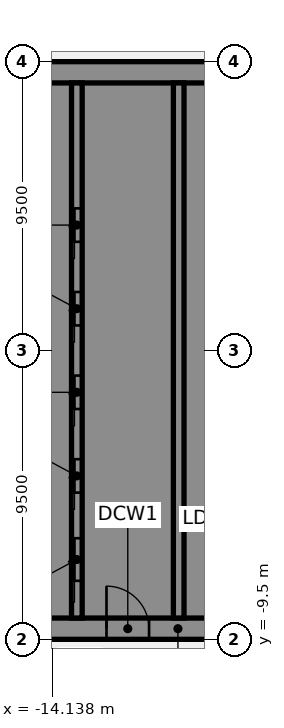
"""IFC4 building model, lengths in metres.
Left out: names, types, materials, properties, quantities, classifications, styles, units other than length and angle.
Written with IfcOpenShell. Run it as: python <this file> out.ifc"""

import sys

from ifc_helpers import new_model, si_unit, direction, frame, frame_2d, origin, place, context, subcontext, project, spatial, polyline, rectangle, outline, extrude, element, fill, save


model = new_model("IFC4")
c1 = context("Model", 3, precision=1e-05, world=origin(), true_north=direction((0.0, 1.0)))
c2 = subcontext(c1, "Body", "Model", "MODEL_VIEW")
j1 = project(units=[si_unit("LENGTHUNIT", "METRE"), si_unit("PLANEANGLEUNIT", "RADIAN")], contexts=[c1])
p1 = place(None, origin())
s1 = spatial("IfcSite", under=j1, at=p1, CompositionType="ELEMENT")
p2 = place(p1, origin())
s2 = spatial("IfcBuilding", under=s1, at=p2, CompositionType="ELEMENT")
p3 = place(p2, frame((0.0, 0.0, 34.0)))
s3 = spatial("IfcBuildingStorey", under=s2, at=p3, CompositionType="ELEMENT", Elevation=34.0)
p4 = place(p3, frame((-16.5, -9.15, 0.0), z_axis=(0.0, 0.0, 1.0), x_axis=(1.0, 0.0, 0.0)))
e1 = element("IfcWall", 1, at=p4, inside=s3, PredefinedType="SHEAR", context=c2, shape_type="SweptSolid", body=[
    extrude(rectangle(XDim=13.0, YDim=0.7, at=frame_2d((6.5, 0.0))), origin(), (0.0, 0.0, 1.0), 3.61),
])
p5 = place(p4, frame((4.15, 0.0, 0.0)))
e2 = element("IfcOpeningElement", 2, at=p5, cuts=e1, PredefinedType="OPENING", context=c2, shape_type="SweptSolid", body=[
    extrude(rectangle(XDim=1.4, YDim=2.1, at=frame_2d((0.7, 1.05))), frame((0.0, 0.36, 0.0), z_axis=(0.0, -1.0, 0.0), x_axis=(1.0, 0.0, 0.0)), (0.0, 0.0, 1.0), 0.72),
])
p6 = place(p4, frame((10.125, 0.0, 0.0)))
e3 = element("IfcOpeningElement", 3, at=p6, cuts=e1, PredefinedType="OPENING", context=c2, shape_type="SweptSolid", body=[
    extrude(rectangle(XDim=1.4, YDim=2.1, at=frame_2d((0.7, 1.05))), frame((0.0, 0.36, 0.0), z_axis=(0.0, -1.0, 0.0), x_axis=(1.0, 0.0, 0.0)), (0.0, 0.0, 1.0), 0.72),
])
p7 = place(p3, origin())
e4 = element("IfcWall", 4, at=p7, inside=s3, PredefinedType="SHEAR", context=c2, shape_type="SweptSolid", body=[
    extrude(outline(polyline([(-13.5, -8.8), (-13.5, -8.125), (-15.8, -8.125), (-15.8, -5.625), (-13.5, -5.625), (-13.5, -5.375), (-15.8, -5.375), (-15.8, -2.875), (-13.5, -2.875), (-13.5, -2.625), (-15.8, -2.625), (-15.8, -0.125), (-13.5, -0.125), (-13.5, 0.125), (-15.8, 0.125), (-15.8, 2.625), (-13.5, 2.625), (-13.5, 2.875), (-15.8, 2.875), (-15.8, 5.375), (-13.5, 5.375), (-13.5, 5.625), (-15.8, 5.625), (-15.8, 8.125), (-13.5, 8.125), (-13.5, 8.8), (-15.8, 8.8), (-16.5, 8.8), (-16.5, -8.8), (-15.8, -8.8), (-13.5, -8.8)])), origin(), (0.0, 0.0, 1.0), 3.61),
])
p8 = place(p3, frame((-16.5, 9.15, 0.0), z_axis=(0.0, 0.0, 1.0), x_axis=(1.0, 0.0, 0.0)))
e5 = element("IfcWall", 5, at=p8, inside=s3, PredefinedType="SHEAR", context=c2, shape_type="SweptSolid", body=[
    extrude(rectangle(XDim=13.0, YDim=0.7, at=frame_2d((6.5, 0.0))), origin(), (0.0, 0.0, 1.0), 3.61),
])
p9 = place(p3, origin())
e6 = element("IfcWall", 6, at=p9, inside=s3, PredefinedType="SHEAR", context=c2, shape_type="SweptSolid", body=[
    extrude(outline(polyline([(-9.8, -5.375), (-9.8, -5.625), (-7.5, -5.625), (-7.15, -5.625), (-7.15, 8.8), (-7.5, 8.8), (-9.8, 8.8), (-9.8, 8.125), (-7.5, 8.125), (-7.5, 5.625), (-9.8, 5.625), (-9.8, 5.375), (-7.5, 5.375), (-7.5, 2.875), (-9.8, 2.875), (-9.8, 2.625), (-7.5, 2.625), (-7.5, 0.125), (-9.8, 0.125), (-9.8, -0.125), (-7.5, -0.125), (-7.5, -2.625), (-9.8, -2.625), (-9.8, -2.875), (-7.5, -2.875), (-7.5, -5.375), (-9.8, -5.375)])), origin(), (0.0, 0.0, 1.0), 3.61),
])
p10 = place(p3, origin())
e7 = element("IfcWall", 7, at=p10, inside=s3, PredefinedType="SHEAR", context=c2, shape_type="SweptSolid", body=[
    extrude(outline(polyline([(-7.5, -8.125), (-9.55, -8.125), (-9.55, -5.625), (-9.8, -5.625), (-9.8, -8.125), (-9.8, -8.8), (-7.5, -8.8), (-7.5, -8.125)])), origin(), (0.0, 0.0, 1.0), 3.61),
])
p11 = place(p3, frame((-13.325, -8.8, 0.0), z_axis=(0.0, 0.0, 1.0), x_axis=(0.0, 1.0, 0.0)))
e8 = element("IfcWall", 8, at=p11, inside=s3, PredefinedType="SHEAR", context=c2, shape_type="SweptSolid", body=[
    extrude(rectangle(XDim=17.6, YDim=0.35, at=frame_2d((8.8, 0.0))), origin(), (0.0, 0.0, 1.0), 3.61),
])
p12 = place(p11, frame((1.225, 0.0, 0.0)))
e9 = element("IfcOpeningElement", 9, at=p12, cuts=e8, PredefinedType="OPENING", context=c2, shape_type="SweptSolid", body=[
    extrude(rectangle(XDim=1.4, YDim=2.1, at=frame_2d((0.7, 1.05))), frame((0.0, 0.185, 0.0), z_axis=(0.0, -1.0, 0.0), x_axis=(1.0, 0.0, 0.0)), (0.0, 0.0, 1.0), 0.37),
])
p13 = place(p11, frame((4.125, 0.0, 0.0)))
e10 = element("IfcOpeningElement", 10, at=p13, cuts=e8, PredefinedType="OPENING", context=c2, shape_type="SweptSolid", body=[
    extrude(rectangle(XDim=1.1, YDim=2.1, at=frame_2d((0.55, 1.05))), frame((0.0, 0.185, 0.0), z_axis=(0.0, -1.0, 0.0), x_axis=(1.0, 0.0, 0.0)), (0.0, 0.0, 1.0), 0.37),
])
p14 = place(p11, frame((6.875, 0.0, 0.0)))
e11 = element("IfcOpeningElement", 11, at=p14, cuts=e8, PredefinedType="OPENING", context=c2, shape_type="SweptSolid", body=[
    extrude(rectangle(XDim=1.1, YDim=2.1, at=frame_2d((0.55, 1.05))), frame((0.0, 0.185, 0.0), z_axis=(0.0, -1.0, 0.0), x_axis=(1.0, 0.0, 0.0)), (0.0, 0.0, 1.0), 0.37),
])
p15 = place(p11, frame((9.625, 0.0, 0.0)))
e12 = element("IfcOpeningElement", 12, at=p15, cuts=e8, PredefinedType="OPENING", context=c2, shape_type="SweptSolid", body=[
    extrude(rectangle(XDim=1.1, YDim=2.1, at=frame_2d((0.55, 1.05))), frame((0.0, 0.185, 0.0), z_axis=(0.0, -1.0, 0.0), x_axis=(1.0, 0.0, 0.0)), (0.0, 0.0, 1.0), 0.37),
])
p16 = place(p11, frame((12.375, 0.0, 0.0)))
e13 = element("IfcOpeningElement", 13, at=p16, cuts=e8, PredefinedType="OPENING", context=c2, shape_type="SweptSolid", body=[
    extrude(rectangle(XDim=1.1, YDim=2.1, at=frame_2d((0.55, 1.05))), frame((0.0, 0.185, 0.0), z_axis=(0.0, -1.0, 0.0), x_axis=(1.0, 0.0, 0.0)), (0.0, 0.0, 1.0), 0.37),
])
p17 = place(p3, frame((-9.975, -8.8, 0.0), z_axis=(0.0, 0.0, 1.0), x_axis=(0.0, 1.0, 0.0)))
e14 = element("IfcWall", 14, at=p17, inside=s3, PredefinedType="SHEAR", context=c2, shape_type="SweptSolid", body=[
    extrude(rectangle(XDim=17.6, YDim=0.35, at=frame_2d((8.8, 0.0))), origin(), (0.0, 0.0, 1.0), 3.61),
])
p18 = place(p5, origin())
e15 = element("IfcDoor", 15, at=p18, inside=s3, OperationType="SINGLE_SWING_LEFT", PredefinedType="DOOR", context=c2, shape_type="SweptSolid", body=[
    extrude(rectangle(XDim=1.4, YDim=2.1, at=frame_2d((0.7, 1.05))), frame((0.0, 0.025, 0.0), z_axis=(0.0, -1.0, 0.0), x_axis=(1.0, 0.0, 0.0)), (0.0, 0.0, 1.0), 0.05),
])
fill(e2, e15)
p19 = place(p12, origin())
e16 = element("IfcDoor", 16, at=p19, inside=s3, OperationType="SLIDING_TO_LEFT", PredefinedType="DOOR", context=c2, shape_type="SweptSolid", body=[
    extrude(rectangle(XDim=1.4, YDim=2.1, at=frame_2d((0.7, 1.05))), frame((0.0, 0.025, 0.0), z_axis=(0.0, -1.0, 0.0), x_axis=(1.0, 0.0, 0.0)), (0.0, 0.0, 1.0), 0.05),
])
fill(e9, e16)
p20 = place(p13, origin())
e17 = element("IfcDoor", 17, at=p20, inside=s3, OperationType="SLIDING_TO_LEFT", PredefinedType="DOOR", context=c2, shape_type="SweptSolid", body=[
    extrude(rectangle(XDim=1.1, YDim=2.1, at=frame_2d((0.55, 1.05))), frame((0.0, 0.025, 0.0), z_axis=(0.0, -1.0, 0.0), x_axis=(1.0, 0.0, 0.0)), (0.0, 0.0, 1.0), 0.05),
])
fill(e10, e17)
p21 = place(p14, origin())
e18 = element("IfcDoor", 18, at=p21, inside=s3, OperationType="SLIDING_TO_LEFT", PredefinedType="DOOR", context=c2, shape_type="SweptSolid", body=[
    extrude(rectangle(XDim=1.1, YDim=2.1, at=frame_2d((0.55, 1.05))), frame((0.0, 0.025, 0.0), z_axis=(0.0, -1.0, 0.0), x_axis=(1.0, 0.0, 0.0)), (0.0, 0.0, 1.0), 0.05),
])
fill(e11, e18)
p22 = place(p15, origin())
e19 = element("IfcDoor", 19, at=p22, inside=s3, OperationType="SLIDING_TO_LEFT", PredefinedType="DOOR", context=c2, shape_type="SweptSolid", body=[
    extrude(rectangle(XDim=1.1, YDim=2.1, at=frame_2d((0.55, 1.05))), frame((0.0, 0.025, 0.0), z_axis=(0.0, -1.0, 0.0), x_axis=(1.0, 0.0, 0.0)), (0.0, 0.0, 1.0), 0.05),
])
fill(e12, e19)
p23 = place(p16, origin())
e20 = element("IfcDoor", 20, at=p23, inside=s3, OperationType="SLIDING_TO_LEFT", PredefinedType="DOOR", context=c2, shape_type="SweptSolid", body=[
    extrude(rectangle(XDim=1.1, YDim=2.1, at=frame_2d((0.55, 1.05))), frame((0.0, 0.025, 0.0), z_axis=(0.0, -1.0, 0.0), x_axis=(1.0, 0.0, 0.0)), (0.0, 0.0, 1.0), 0.05),
])
fill(e13, e20)
save(model, sys.argv[1])
